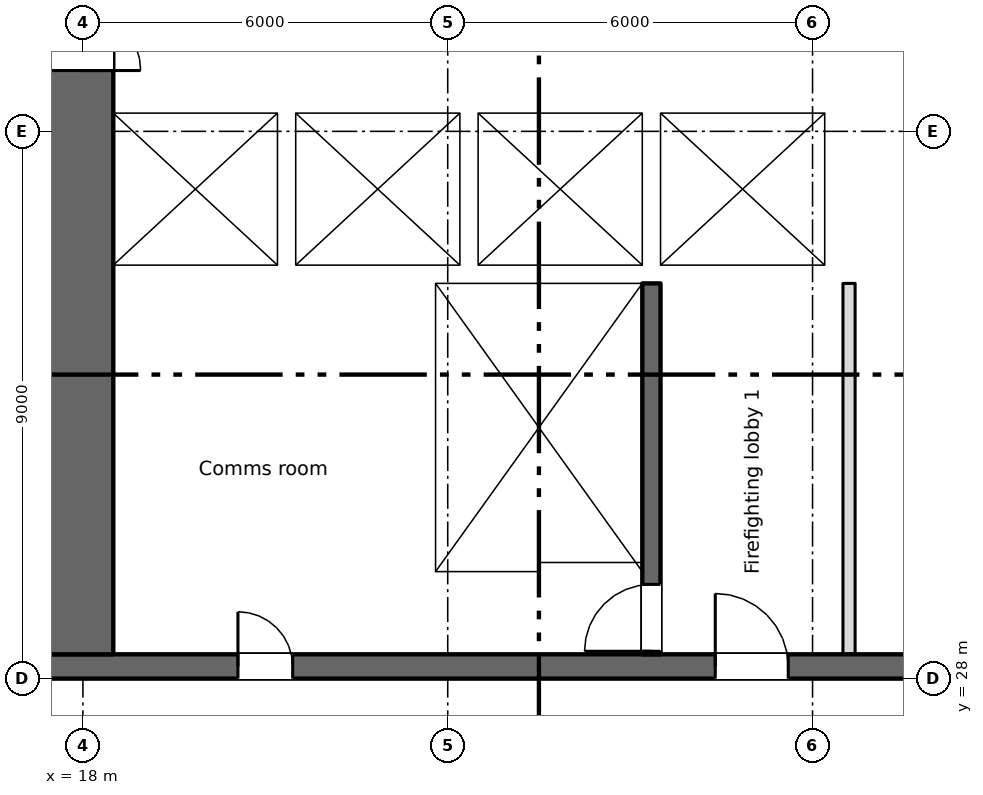
"""IFC4 building model, lengths in metres.
Left out: names, types, materials, properties, quantities, classifications, styles, units other than length and angle.
Written with IfcOpenShell. Run it as: python <this file> out.ifc"""

import sys

from ifc_helpers import new_model, si_unit, direction, frame, frame_2d, origin, place, context, subcontext, project, spatial, rectangle, extrude, element, fill, save


model = new_model("IFC4")
c1 = context("Model", 3, precision=1e-05, world=origin(), true_north=direction((0.0, 1.0)))
c2 = subcontext(c1, "Body", "Model", "MODEL_VIEW")
j1 = project(units=[si_unit("LENGTHUNIT", "METRE"), si_unit("PLANEANGLEUNIT", "RADIAN")], contexts=[c1])
p1 = place(None, origin())
s1 = spatial("IfcSite", under=j1, at=p1, CompositionType="ELEMENT")
p2 = place(p1, origin())
s2 = spatial("IfcBuilding", under=s1, at=p2, CompositionType="ELEMENT")
p3 = place(p2, frame((0.0, 0.0, 6.5)))
s3 = spatial("IfcBuildingStorey", under=s2, at=p3, CompositionType="ELEMENT", Elevation=6.5)
p4 = place(p3, frame((6.7, 28.2, 0.0), z_axis=(0.0, 0.0, 1.0), x_axis=(1.0, 0.0, 0.0)))
e1 = element("IfcWall", 1, at=p4, inside=s3, PredefinedType="SHEAR", context=c2, shape_type="SweptSolid", body=[
    extrude(rectangle(XDim=66.3, YDim=0.4, at=frame_2d((33.15, 0.0))), origin(), (0.0, 0.0, 1.0), 4.3),
])
p5 = place(p4, frame((13.85, 0.0, 0.0)))
e2 = element("IfcOpeningElement", 2, at=p5, cuts=e1, PredefinedType="OPENING", context=c2, shape_type="SweptSolid", body=[
    extrude(rectangle(XDim=0.9, YDim=2.1, at=frame_2d((0.45, 1.05))), frame((0.0, 0.21, 0.0), z_axis=(0.0, -1.0, 0.0), x_axis=(1.0, 0.0, 0.0)), (0.0, 0.0, 1.0), 0.42),
])
p6 = place(p4, frame((48.562, 0.0, 0.0)))
e3 = element("IfcOpeningElement", 3, at=p6, cuts=e1, PredefinedType="OPENING", context=c2, shape_type="SweptSolid", body=[
    extrude(rectangle(XDim=0.9, YDim=2.1, at=frame_2d((0.45, 1.05))), frame((0.0, 0.21, 0.0), z_axis=(0.0, -1.0, 0.0), x_axis=(1.0, 0.0, 0.0)), (0.0, 0.0, 1.0), 0.42),
])
p7 = place(p4, frame((51.137, 0.0, 0.0)))
e4 = element("IfcOpeningElement", 4, at=p7, cuts=e1, PredefinedType="OPENING", context=c2, shape_type="SweptSolid", body=[
    extrude(rectangle(XDim=0.9, YDim=2.1, at=frame_2d((0.45, 1.05))), frame((0.0, 0.21, 0.0), z_axis=(0.0, -1.0, 0.0), x_axis=(1.0, 0.0, 0.0)), (0.0, 0.0, 1.0), 0.42),
])
p8 = place(p4, frame((1.35, 0.0, 0.0)))
e5 = element("IfcOpeningElement", 5, at=p8, cuts=e1, PredefinedType="OPENING", context=c2, shape_type="SweptSolid", body=[
    extrude(rectangle(XDim=0.9, YDim=2.1, at=frame_2d((0.45, 1.05))), frame((0.0, 0.21, 0.0), z_axis=(0.0, -1.0, 0.0), x_axis=(1.0, 0.0, 0.0)), (0.0, 0.0, 1.0), 0.42),
])
p9 = place(p4, frame((59.363, 0.0, 0.0)))
e6 = element("IfcOpeningElement", 6, at=p9, cuts=e1, PredefinedType="OPENING", context=c2, shape_type="SweptSolid", body=[
    extrude(rectangle(XDim=0.9, YDim=2.1, at=frame_2d((0.45, 1.05))), frame((0.0, 0.21, 0.0), z_axis=(0.0, -1.0, 0.0), x_axis=(1.0, 0.0, 0.0)), (0.0, 0.0, 1.0), 0.42),
])
p10 = place(p4, frame((63.538, 0.0, 0.0)))
e7 = element("IfcOpeningElement", 7, at=p10, cuts=e1, PredefinedType="OPENING", context=c2, shape_type="SweptSolid", body=[
    extrude(rectangle(XDim=0.9, YDim=2.1, at=frame_2d((0.45, 1.05))), frame((0.0, 0.21, 0.0), z_axis=(0.0, -1.0, 0.0), x_axis=(1.0, 0.0, 0.0)), (0.0, 0.0, 1.0), 0.42),
])
p11 = place(p4, frame((4.7, 0.0, 0.0)))
e8 = element("IfcOpeningElement", 8, at=p11, cuts=e1, PredefinedType="OPENING", context=c2, shape_type="SweptSolid", body=[
    extrude(rectangle(XDim=1.2, YDim=2.1, at=frame_2d((0.6, 1.05))), frame((0.0, 0.21, 0.0), z_axis=(0.0, -1.0, 0.0), x_axis=(1.0, 0.0, 0.0)), (0.0, 0.0, 1.0), 0.42),
])
p12 = place(p4, frame((31.7, 0.0, 0.0)))
e9 = element("IfcOpeningElement", 9, at=p12, cuts=e1, PredefinedType="OPENING", context=c2, shape_type="SweptSolid", body=[
    extrude(rectangle(XDim=1.2, YDim=2.1, at=frame_2d((0.6, 1.05))), frame((0.0, 0.21, 0.0), z_axis=(0.0, -1.0, 0.0), x_axis=(1.0, 0.0, 0.0)), (0.0, 0.0, 1.0), 0.42),
])
p13 = place(p4, frame((55.2, 0.0, 0.0)))
e10 = element("IfcOpeningElement", 10, at=p13, cuts=e1, PredefinedType="OPENING", context=c2, shape_type="SweptSolid", body=[
    extrude(rectangle(XDim=1.2, YDim=2.1, at=frame_2d((0.6, 1.05))), frame((0.0, 0.21, 0.0), z_axis=(0.0, -1.0, 0.0), x_axis=(1.0, 0.0, 0.0)), (0.0, 0.0, 1.0), 0.42),
])
p14 = place(p4, frame((21.7, 0.0, 0.0)))
e11 = element("IfcOpeningElement", 11, at=p14, cuts=e1, PredefinedType="OPENING", context=c2, shape_type="SweptSolid", body=[
    extrude(rectangle(XDim=1.2, YDim=2.1, at=frame_2d((0.6, 1.05))), frame((0.0, 0.21, 0.0), z_axis=(0.0, -1.0, 0.0), x_axis=(1.0, 0.0, 0.0)), (0.0, 0.0, 1.0), 0.42),
])
p15 = place(p4, frame((41.7, 0.0, 0.0)))
e12 = element("IfcOpeningElement", 12, at=p15, cuts=e1, PredefinedType="OPENING", context=c2, shape_type="SweptSolid", body=[
    extrude(rectangle(XDim=1.2, YDim=2.1, at=frame_2d((0.6, 1.05))), frame((0.0, 0.21, 0.0), z_axis=(0.0, -1.0, 0.0), x_axis=(1.0, 0.0, 0.0)), (0.0, 0.0, 1.0), 0.42),
])
p16 = place(p4, frame((24.85, 0.0, 0.0)))
e13 = element("IfcOpeningElement", 13, at=p16, cuts=e1, PredefinedType="OPENING", context=c2, shape_type="SweptSolid", body=[
    extrude(rectangle(XDim=2.4, YDim=2.1, at=frame_2d((1.2, 1.05))), frame((0.0, 0.21, 0.0), z_axis=(0.0, -1.0, 0.0), x_axis=(1.0, 0.0, 0.0)), (0.0, 0.0, 1.0), 0.42),
])
p17 = place(p4, frame((37.35, 0.0, 0.0)))
e14 = element("IfcOpeningElement", 14, at=p17, cuts=e1, PredefinedType="OPENING", context=c2, shape_type="SweptSolid", body=[
    extrude(rectangle(XDim=2.4, YDim=2.1, at=frame_2d((1.2, 1.05))), frame((0.0, 0.21, 0.0), z_axis=(0.0, -1.0, 0.0), x_axis=(1.0, 0.0, 0.0)), (0.0, 0.0, 1.0), 0.42),
])
p18 = place(p4, frame((7.8, 0.0, 0.0)))
e15 = element("IfcOpeningElement", 15, at=p18, cuts=e1, PredefinedType="OPENING", context=c2, shape_type="SweptSolid", body=[
    extrude(rectangle(XDim=2.4, YDim=2.1, at=frame_2d((1.2, 1.05))), frame((0.0, 0.21, 0.0), z_axis=(0.0, -1.0, 0.0), x_axis=(1.0, 0.0, 0.0)), (0.0, 0.0, 1.0), 0.42),
])
p19 = place(p4, frame((28.85, 0.0, 0.0)))
e16 = element("IfcOpeningElement", 16, at=p19, cuts=e1, PredefinedType="OPENING", context=c2, shape_type="SweptSolid", body=[
    extrude(rectangle(XDim=0.9, YDim=2.1, at=frame_2d((0.45, 1.05))), frame((0.0, 0.21, 0.0), z_axis=(0.0, -1.0, 0.0), x_axis=(1.0, 0.0, 0.0)), (0.0, 0.0, 1.0), 0.42),
])
p20 = place(p4, frame((34.85, 0.0, 0.0)))
e17 = element("IfcOpeningElement", 17, at=p20, cuts=e1, PredefinedType="OPENING", context=c2, shape_type="SweptSolid", body=[
    extrude(rectangle(XDim=0.9, YDim=2.1, at=frame_2d((0.45, 1.05))), frame((0.0, 0.21, 0.0), z_axis=(0.0, -1.0, 0.0), x_axis=(1.0, 0.0, 0.0)), (0.0, 0.0, 1.0), 0.42),
])
p21 = place(p3, frame((17.95, 28.4, 0.0), z_axis=(0.0, 0.0, 1.0), x_axis=(0.0, 1.0, 0.0)))
e18 = element("IfcWall", 18, at=p21, inside=s3, PredefinedType="SHEAR", context=c2, shape_type="SweptSolid", body=[
    extrude(rectangle(XDim=16.5, YDim=1.1, at=frame_2d((8.25, 0.0))), origin(), (0.0, 0.0, 1.0), 4.3),
])
p22 = place(p21, frame((9.6, 0.0, 0.0)))
e19 = element("IfcOpeningElement", 19, at=p22, cuts=e18, PredefinedType="OPENING", context=c2, shape_type="SweptSolid", body=[
    extrude(rectangle(XDim=2.0, YDim=2.1, at=frame_2d((1.0, 1.05))), frame((0.0, 0.56, 0.0), z_axis=(0.0, -1.0, 0.0), x_axis=(1.0, 0.0, 0.0)), (0.0, 0.0, 1.0), 1.12),
])
p23 = place(p21, frame((15.2, 0.0, 0.0)))
e20 = element("IfcOpeningElement", 20, at=p23, cuts=e18, PredefinedType="OPENING", context=c2, shape_type="SweptSolid", body=[
    extrude(rectangle(XDim=1.2, YDim=2.1, at=frame_2d((0.6, 1.05))), frame((0.0, 0.56, 0.0), z_axis=(0.0, -1.0, 0.0), x_axis=(1.0, 0.0, 0.0)), (0.0, 0.0, 1.0), 1.12),
])
p24 = place(p3, frame((23.65, 28.4, 0.0), z_axis=(0.0, 0.0, 1.0), x_axis=(0.0, 1.0, 0.0)))
e21 = element("IfcWall", 21, at=p24, inside=s3, PredefinedType="SHEAR", context=c2, shape_type="SweptSolid", body=[
    extrude(rectangle(XDim=6.1, YDim=0.3, at=frame_2d((3.05, 0.0))), origin(), (0.0, 0.0, 1.0), 4.3),
])
p25 = place(p3, frame((27.35, 28.4, 0.0), z_axis=(0.0, 0.0, 1.0), x_axis=(0.0, 1.0, 0.0)))
e22 = element("IfcWall", 22, at=p25, inside=s3, PredefinedType="SHEAR", context=c2, shape_type="SweptSolid", body=[
    extrude(rectangle(XDim=6.1, YDim=0.3, at=frame_2d((3.05, 0.0))), origin(), (0.0, 0.0, 1.0), 4.3),
])
p26 = place(p25, frame((0.05, 0.0, 0.0)))
e23 = element("IfcOpeningElement", 23, at=p26, cuts=e22, PredefinedType="OPENING", context=c2, shape_type="SweptSolid", body=[
    extrude(rectangle(XDim=1.1, YDim=2.1, at=frame_2d((0.55, 1.05))), frame((0.0, 0.16, 0.0), z_axis=(0.0, -1.0, 0.0), x_axis=(1.0, 0.0, 0.0)), (0.0, 0.0, 1.0), 0.32),
])
p27 = place(p3, frame((18.5, 34.65, 0.0), z_axis=(0.0, 0.0, 1.0), x_axis=(1.0, 0.0, 0.0)))
e24 = element("IfcWall", 24, at=p27, inside=s3, PredefinedType="SHEAR", context=c2, shape_type="SweptSolid", body=[
    extrude(rectangle(XDim=12.2, YDim=0.3, at=frame_2d((6.1, 0.0))), origin(), (0.0, 0.0, 1.0), 4.3),
])
p28 = place(p27, frame((9.8, 0.0, 0.0)))
e25 = element("IfcOpeningElement", 25, at=p28, cuts=e24, PredefinedType="OPENING", context=c2, shape_type="SweptSolid", body=[
    extrude(rectangle(XDim=1.1, YDim=2.1, at=frame_2d((0.55, 1.05))), frame((0.0, 0.16, 0.0), z_axis=(0.0, -1.0, 0.0), x_axis=(1.0, 0.0, 0.0)), (0.0, 0.0, 1.0), 0.32),
])
p29 = place(p3, frame((18.5, 37.45, 0.0), z_axis=(0.0, 0.0, 1.0), x_axis=(1.0, 0.0, 0.0)))
e26 = element("IfcWall", 26, at=p29, inside=s3, PredefinedType="SHEAR", context=c2, shape_type="SweptSolid", body=[
    extrude(rectangle(XDim=12.2, YDim=0.3, at=frame_2d((6.1, 0.0))), origin(), (0.0, 0.0, 1.0), 4.3),
])
p30 = place(p29, frame((0.8, 0.0, 0.0)))
e27 = element("IfcOpeningElement", 27, at=p30, cuts=e26, PredefinedType="OPENING", context=c2, shape_type="SweptSolid", body=[
    extrude(rectangle(XDim=1.1, YDim=2.1, at=frame_2d((0.55, 1.05))), frame((0.0, 0.16, 0.0), z_axis=(0.0, -1.0, 0.0), x_axis=(1.0, 0.0, 0.0)), (0.0, 0.0, 1.0), 0.32),
])
p31 = place(p29, frame((3.8, 0.0, 0.0)))
e28 = element("IfcOpeningElement", 28, at=p31, cuts=e26, PredefinedType="OPENING", context=c2, shape_type="SweptSolid", body=[
    extrude(rectangle(XDim=1.1, YDim=2.1, at=frame_2d((0.55, 1.05))), frame((0.0, 0.16, 0.0), z_axis=(0.0, -1.0, 0.0), x_axis=(1.0, 0.0, 0.0)), (0.0, 0.0, 1.0), 0.32),
])
p32 = place(p29, frame((6.8, 0.0, 0.0)))
e29 = element("IfcOpeningElement", 29, at=p32, cuts=e26, PredefinedType="OPENING", context=c2, shape_type="SweptSolid", body=[
    extrude(rectangle(XDim=1.1, YDim=2.1, at=frame_2d((0.55, 1.05))), frame((0.0, 0.16, 0.0), z_axis=(0.0, -1.0, 0.0), x_axis=(1.0, 0.0, 0.0)), (0.0, 0.0, 1.0), 0.32),
])
p33 = place(p3, frame((27.35, 34.8, 0.0), z_axis=(0.0, 0.0, 1.0), x_axis=(0.0, 1.0, 0.0)))
e30 = element("IfcWall", 30, at=p33, inside=s3, PredefinedType="SHEAR", context=c2, shape_type="SweptSolid", body=[
    extrude(rectangle(XDim=2.5, YDim=0.3, at=frame_2d((1.25, 0.0))), origin(), (0.0, 0.0, 1.0), 4.3),
])
p34 = place(p3, frame((30.45, 34.8, 0.0), z_axis=(0.0, 0.0, 1.0), x_axis=(0.0, 1.0, 0.0)))
e31 = element("IfcWall", 31, at=p34, inside=s3, PredefinedType="SHEAR", context=c2, shape_type="SweptSolid", body=[
    extrude(rectangle(XDim=2.5, YDim=0.5, at=frame_2d((1.25, 0.0))), origin(), (0.0, 0.0, 1.0), 4.3),
])
for number, where, z_axis, x_axis in (
    (32, (21.35, 34.8, 0.0), (0.0, 0.0, 1.0), (0.0, 1.0, 0.0)),
    (33, (24.35, 34.8, 0.0), (0.0, 0.0, 1.0), (0.0, 1.0, 0.0)),
):
    element("IfcWall", number, at=place(p3, frame(where, z_axis=z_axis, x_axis=x_axis)), inside=s3, PredefinedType="SHEAR", context=c2, shape_type="SweptSolid", body=[
        extrude(rectangle(XDim=2.5, YDim=0.3, at=frame_2d((1.25, 0.0))), origin(), (0.0, 0.0, 1.0), 4.3),
    ])
p35 = place(p3, frame((30.6, 28.4, 0.0), z_axis=(0.0, 0.0, 1.0), x_axis=(0.0, 1.0, 0.0)))
e34 = element("IfcWall", 34, at=p35, inside=s3, PredefinedType="PARTITIONING", context=c2, shape_type="SweptSolid", body=[
    extrude(rectangle(XDim=6.1, YDim=0.2, at=frame_2d((3.05, 0.0))), origin(), (0.0, 0.0, 1.0), 4.3),
])
p36 = place(p5, origin())
e35 = element("IfcDoor", 35, at=p36, inside=s3, OperationType="SINGLE_SWING_LEFT", PredefinedType="DOOR", context=c2, shape_type="SweptSolid", body=[
    extrude(rectangle(XDim=0.9, YDim=2.1, at=frame_2d((0.45, 1.05))), frame((0.0, 0.025, 0.0), z_axis=(0.0, -1.0, 0.0), x_axis=(1.0, 0.0, 0.0)), (0.0, 0.0, 1.0), 0.05),
])
fill(e2, e35)
p37 = place(p30, origin())
e36 = element("IfcDoor", 36, at=p37, inside=s3, OperationType="SLIDING_TO_LEFT", PredefinedType="DOOR", context=c2, shape_type="SweptSolid", body=[
    extrude(rectangle(XDim=1.1, YDim=2.1, at=frame_2d((0.55, 1.05))), frame((0.0, 0.025, 0.0), z_axis=(0.0, -1.0, 0.0), x_axis=(1.0, 0.0, 0.0)), (0.0, 0.0, 1.0), 0.05),
])
fill(e27, e36)
p38 = place(p31, origin())
e37 = element("IfcDoor", 37, at=p38, inside=s3, OperationType="SLIDING_TO_LEFT", PredefinedType="DOOR", context=c2, shape_type="SweptSolid", body=[
    extrude(rectangle(XDim=1.1, YDim=2.1, at=frame_2d((0.55, 1.05))), frame((0.0, 0.025, 0.0), z_axis=(0.0, -1.0, 0.0), x_axis=(1.0, 0.0, 0.0)), (0.0, 0.0, 1.0), 0.05),
])
fill(e28, e37)
p39 = place(p32, origin())
e38 = element("IfcDoor", 38, at=p39, inside=s3, OperationType="SLIDING_TO_LEFT", PredefinedType="DOOR", context=c2, shape_type="SweptSolid", body=[
    extrude(rectangle(XDim=1.1, YDim=2.1, at=frame_2d((0.55, 1.05))), frame((0.0, 0.025, 0.0), z_axis=(0.0, -1.0, 0.0), x_axis=(1.0, 0.0, 0.0)), (0.0, 0.0, 1.0), 0.05),
])
fill(e29, e38)
p40 = place(p28, origin())
e39 = element("IfcDoor", 39, at=p40, inside=s3, OperationType="SLIDING_TO_LEFT", PredefinedType="DOOR", context=c2, shape_type="SweptSolid", body=[
    extrude(rectangle(XDim=1.1, YDim=2.1, at=frame_2d((0.55, 1.05))), frame((0.0, 0.025, 0.0), z_axis=(0.0, -1.0, 0.0), x_axis=(1.0, 0.0, 0.0)), (0.0, 0.0, 1.0), 0.05),
])
fill(e25, e39)
p41 = place(p26, origin())
e40 = element("IfcDoor", 40, at=p41, inside=s3, OperationType="SINGLE_SWING_LEFT", PredefinedType="DOOR", context=c2, shape_type="SweptSolid", body=[
    extrude(rectangle(XDim=1.1, YDim=2.1, at=frame_2d((0.55, 1.05))), frame((0.0, 0.025, 0.0), z_axis=(0.0, -1.0, 0.0), x_axis=(1.0, 0.0, 0.0)), (0.0, 0.0, 1.0), 0.05),
])
fill(e23, e40)
p42 = place(p14, origin())
e41 = element("IfcDoor", 41, at=p42, inside=s3, OperationType="SINGLE_SWING_LEFT", PredefinedType="DOOR", context=c2, shape_type="SweptSolid", body=[
    extrude(rectangle(XDim=1.2, YDim=2.1, at=frame_2d((0.6, 1.05))), frame((0.0, 0.025, 0.0), z_axis=(0.0, -1.0, 0.0), x_axis=(1.0, 0.0, 0.0)), (0.0, 0.0, 1.0), 0.05),
])
fill(e11, e41)
p43 = place(p22, origin())
e42 = element("IfcDoor", 42, at=p43, inside=s3, OperationType="DOUBLE_DOOR_SINGLE_SWING", PredefinedType="DOOR", context=c2, shape_type="SweptSolid", body=[
    extrude(rectangle(XDim=2.0, YDim=2.1, at=frame_2d((1.0, 1.05))), frame((0.0, 0.025, 0.0), z_axis=(0.0, -1.0, 0.0), x_axis=(1.0, 0.0, 0.0)), (0.0, 0.0, 1.0), 0.05),
])
fill(e19, e42)
save(model, sys.argv[1])
